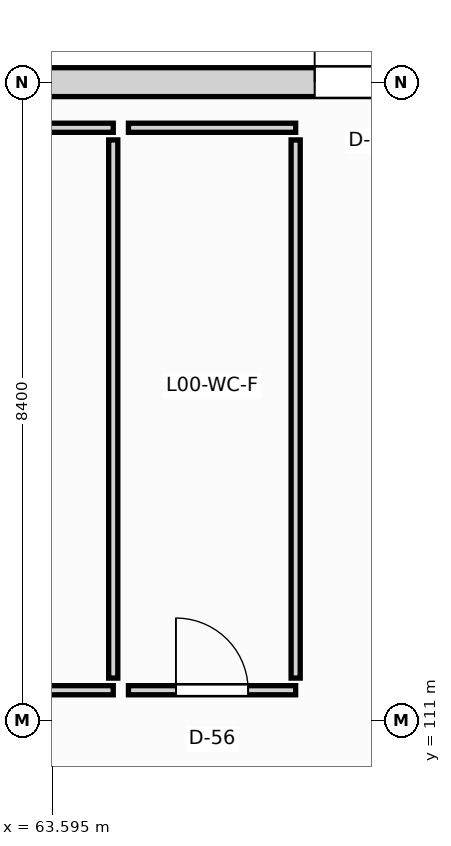
"""IFC4 building model, lengths in metres.
Left out: names, types, materials, properties, quantities, classifications, styles, units other than length and angle.
Written with IfcOpenShell. Run it as: python <this file> out.ifc"""

import sys

from ifc_helpers import new_model, si_unit, direction, frame, frame_2d, origin, place, context, subcontext, project, spatial, rectangle, extrude, element, fill, save


model = new_model("IFC4")
c1 = context("Model", 3, precision=1e-05, world=origin(), true_north=direction((0.0, 1.0)))
c2 = subcontext(c1, "Body", "Model", "MODEL_VIEW")
j1 = project(units=[si_unit("LENGTHUNIT", "METRE"), si_unit("PLANEANGLEUNIT", "RADIAN")], contexts=[c1])
p1 = place(None, origin())
s1 = spatial("IfcSite", under=j1, at=p1, CompositionType="ELEMENT")
p2 = place(p1, origin())
s2 = spatial("IfcBuilding", under=s1, at=p2, CompositionType="ELEMENT")
p3 = place(p2, origin())
s3 = spatial("IfcBuildingStorey", under=s2, at=p3, CompositionType="ELEMENT", Elevation=0.0)
p4 = place(p3, frame((60.452, 119.4, 0.0), z_axis=(0.0, 0.0, 1.0), x_axis=(1.0, 0.0, 0.0)))
e1 = element("IfcWall", 1, at=p4, inside=s3, PredefinedType="SOLIDWALL", context=c2, shape_type="SweptSolid", body=[
    extrude(rectangle(XDim=8.696, YDim=0.38, at=frame_2d((4.348, 0.0))), origin(), (0.0, 0.0, 1.0), 4.28),
])
p5 = place(p4, frame((6.598, 0.0, 0.0)))
e2 = element("IfcOpeningElement", 2, at=p5, cuts=e1, PredefinedType="OPENING", context=c2, shape_type="SweptSolid", body=[
    extrude(rectangle(XDim=1.5, YDim=2.2, at=frame_2d((0.75, 1.1))), frame((0.0, 0.2, 0.0), z_axis=(0.0, -1.0, 0.0), x_axis=(1.0, 0.0, 0.0)), (0.0, 0.0, 1.0), 0.4),
])
p6 = place(p3, frame((60.8, 111.4, 0.0), z_axis=(0.0, 0.0, 1.0), x_axis=(1.0, 0.0, 0.0)))
e3 = element("IfcWall", 3, at=p6, inside=s3, PredefinedType="PARTITIONING", context=c2, shape_type="SweptSolid", body=[
    extrude(rectangle(XDim=3.6, YDim=0.12, at=frame_2d((1.8, 0.0))), origin(), (0.0, 0.0, 1.0), 4.12),
])
p7 = place(p6, frame((1.325, 0.0, 0.0)))
e4 = element("IfcOpeningElement", 4, at=p7, cuts=e3, PredefinedType="OPENING", context=c2, shape_type="SweptSolid", body=[
    extrude(rectangle(XDim=0.95, YDim=2.1, at=frame_2d((0.475, 1.05))), frame((0.0, 0.07, 0.0), z_axis=(0.0, -1.0, 0.0), x_axis=(1.0, 0.0, 0.0)), (0.0, 0.0, 1.0), 0.14),
])
p8 = place(p3, frame((60.8, 118.8, 0.0), z_axis=(0.0, 0.0, 1.0), x_axis=(1.0, 0.0, 0.0)))
e5 = element("IfcWall", 5, at=p8, inside=s3, PredefinedType="PARTITIONING", context=c2, shape_type="SweptSolid", body=[
    extrude(rectangle(XDim=3.6, YDim=0.12, at=frame_2d((1.8, 0.0))), origin(), (0.0, 0.0, 1.0), 4.12),
])
p9 = place(p3, frame((64.4, 111.56, 0.0), z_axis=(0.0, 0.0, 1.0), x_axis=(0.0, 1.0, 0.0)))
e6 = element("IfcWall", 6, at=p9, inside=s3, PredefinedType="PARTITIONING", context=c2, shape_type="SweptSolid", body=[
    extrude(rectangle(XDim=7.08, YDim=0.12, at=frame_2d((3.54, 0.0))), origin(), (0.0, 0.0, 1.0), 4.12),
])
p10 = place(p3, frame((64.6, 111.4, 0.0), z_axis=(0.0, 0.0, 1.0), x_axis=(1.0, 0.0, 0.0)))
e7 = element("IfcWall", 7, at=p10, inside=s3, PredefinedType="PARTITIONING", context=c2, shape_type="SweptSolid", body=[
    extrude(rectangle(XDim=2.2, YDim=0.12, at=frame_2d((1.1, 0.0))), origin(), (0.0, 0.0, 1.0), 4.12),
])
p11 = place(p10, frame((0.625, 0.0, 0.0)))
e8 = element("IfcOpeningElement", 8, at=p11, cuts=e7, PredefinedType="OPENING", context=c2, shape_type="SweptSolid", body=[
    extrude(rectangle(XDim=0.95, YDim=2.1, at=frame_2d((0.475, 1.05))), frame((0.0, 0.07, 0.0), z_axis=(0.0, -1.0, 0.0), x_axis=(1.0, 0.0, 0.0)), (0.0, 0.0, 1.0), 0.14),
])
p12 = place(p3, frame((64.6, 118.8, 0.0), z_axis=(0.0, 0.0, 1.0), x_axis=(1.0, 0.0, 0.0)))
e9 = element("IfcWall", 9, at=p12, inside=s3, PredefinedType="PARTITIONING", context=c2, shape_type="SweptSolid", body=[
    extrude(rectangle(XDim=2.2, YDim=0.12, at=frame_2d((1.1, 0.0))), origin(), (0.0, 0.0, 1.0), 4.12),
])
p13 = place(p3, frame((66.8, 111.56, 0.0), z_axis=(0.0, 0.0, 1.0), x_axis=(0.0, 1.0, 0.0)))
e10 = element("IfcWall", 10, at=p13, inside=s3, PredefinedType="PARTITIONING", context=c2, shape_type="SweptSolid", body=[
    extrude(rectangle(XDim=7.08, YDim=0.12, at=frame_2d((3.54, 0.0))), origin(), (0.0, 0.0, 1.0), 4.12),
])
p14 = place(p5, origin())
e11 = element("IfcDoor", 11, at=p14, inside=s3, OperationType="SINGLE_SWING_LEFT", PredefinedType="DOOR", context=c2, shape_type="SweptSolid", body=[
    extrude(rectangle(XDim=1.5, YDim=2.2, at=frame_2d((0.75, 1.1))), frame((0.0, 0.025, 0.0), z_axis=(0.0, -1.0, 0.0), x_axis=(1.0, 0.0, 0.0)), (0.0, 0.0, 1.0), 0.05),
])
fill(e2, e11)
p15 = place(p11, origin())
e12 = element("IfcDoor", 12, at=p15, inside=s3, OperationType="SINGLE_SWING_LEFT", PredefinedType="DOOR", context=c2, shape_type="SweptSolid", body=[
    extrude(rectangle(XDim=0.95, YDim=2.1, at=frame_2d((0.475, 1.05))), frame((0.0, 0.025, 0.0), z_axis=(0.0, -1.0, 0.0), x_axis=(1.0, 0.0, 0.0)), (0.0, 0.0, 1.0), 0.05),
])
fill(e8, e12)
save(model, sys.argv[1])
